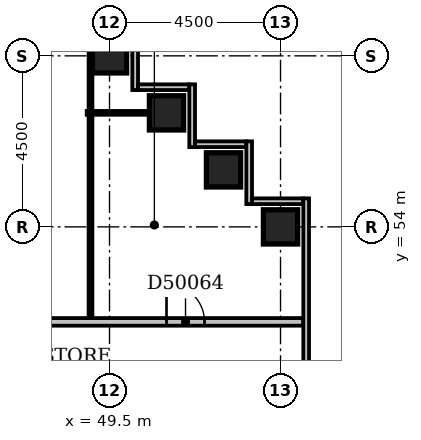
"""IFC4 building model, lengths in metres.
Left out: names, types, materials, properties, quantities, classifications, styles, units other than length and angle.
Written with IfcOpenShell. Run it as: python <this file> out.ifc"""

import sys

from ifc_helpers import new_model, si_unit, direction, frame, frame_2d, origin, origin_2d, place, context, subcontext, project, spatial, rectangle, extrude, element, fill, save


model = new_model("IFC4")
c1 = context("Model", 3, precision=1e-05, world=origin(), true_north=direction((0.0, 1.0)))
c2 = subcontext(c1, "Body", "Model", "MODEL_VIEW")
j1 = project(units=[si_unit("LENGTHUNIT", "METRE"), si_unit("PLANEANGLEUNIT", "RADIAN")], contexts=[c1])
p1 = place(None, origin())
s1 = spatial("IfcSite", under=j1, at=p1, CompositionType="ELEMENT")
p2 = place(p1, origin())
s2 = spatial("IfcBuilding", under=s1, at=p2, CompositionType="ELEMENT")
p3 = place(p2, frame((0.0, 0.0, 197.0)))
s3 = spatial("IfcBuildingStorey", under=s2, at=p3, CompositionType="ELEMENT", Elevation=197.0)
for number, where, z_axis, x_axis in (
    (1, (54.0, 54.0, -0.3), (0.0, 0.0, 1.0), (1.0, 0.0, 0.0)),
    (2, (52.5, 55.5, -0.3), (0.0, 0.0, 1.0), (1.0, 0.0, 0.0)),
    (3, (51.0, 57.0, -0.3), (0.0, 0.0, 1.0), (1.0, 0.0, 0.0)),
    (4, (49.5, 58.5, -0.3), (0.0, 0.0, 1.0), (1.0, 0.0, 0.0)),
):
    element("IfcColumn", number, at=place(p3, frame(where, z_axis=z_axis, x_axis=x_axis)), inside=s3, PredefinedType="COLUMN", context=c2, shape_type="SweptSolid", body=[
        extrude(rectangle(XDim=0.9, YDim=0.9, at=origin_2d()), origin(), (0.0, 0.0, 1.0), 3.6),
    ])
p4 = place(p3, frame((54.675, 39.9, 0.0), z_axis=(0.0, 0.0, 1.0), x_axis=(0.0, 1.0, 0.0)))
e5 = element("IfcWall", 5, at=p4, inside=s3, PredefinedType="STANDARD", context=c2, shape_type="SweptSolid", body=[
    extrude(rectangle(XDim=14.85, YDim=0.15, at=frame_2d((7.425, 0.0))), origin(), (0.0, 0.0, 1.0), 2.7),
])
p5 = place(p4, frame((5.848, 0.0, 0.6)))
e6 = element("IfcOpeningElement", 6, at=p5, cuts=e5, PredefinedType="OPENING", context=c2, shape_type="SweptSolid", body=[
    extrude(rectangle(XDim=0.6, YDim=1.8, at=frame_2d((0.3, 0.9))), frame((0.0, 0.087, 0.0), z_axis=(0.0, -1.0, 0.0), x_axis=(1.0, 0.0, 0.0)), (0.0, 0.0, 1.0), 0.174),
])
p6 = place(p4, frame((8.226, 0.0, 0.6)))
e7 = element("IfcOpeningElement", 7, at=p6, cuts=e5, PredefinedType="OPENING", context=c2, shape_type="SweptSolid", body=[
    extrude(rectangle(XDim=0.6, YDim=1.8, at=frame_2d((0.3, 0.9))), frame((0.0, 0.087, 0.0), z_axis=(0.0, -1.0, 0.0), x_axis=(1.0, 0.0, 0.0)), (0.0, 0.0, 1.0), 0.174),
])
p7 = place(p3, frame((54.6, 54.675, 0.0), z_axis=(0.0, 0.0, 1.0), x_axis=(-1.0, 0.0, 0.0)))
e8 = element("IfcWall", 8, at=p7, inside=s3, PredefinedType="STANDARD", context=c2, shape_type="SweptSolid", body=[
    extrude(rectangle(XDim=1.35, YDim=0.15, at=frame_2d((0.675, 0.0))), origin(), (0.0, 0.0, 1.0), 2.7),
])
p8 = place(p3, frame((53.175, 54.6, 0.0), z_axis=(0.0, 0.0, 1.0), x_axis=(0.0, 1.0, 0.0)))
e9 = element("IfcWall", 9, at=p8, inside=s3, PredefinedType="STANDARD", context=c2, shape_type="SweptSolid", body=[
    extrude(rectangle(XDim=1.65, YDim=0.15, at=frame_2d((0.825, 0.0))), origin(), (0.0, 0.0, 1.0), 2.7),
])
p9 = place(p3, frame((53.1, 56.175, 0.0), z_axis=(0.0, 0.0, 1.0), x_axis=(-1.0, 0.0, 0.0)))
e10 = element("IfcWall", 10, at=p9, inside=s3, PredefinedType="STANDARD", context=c2, shape_type="SweptSolid", body=[
    extrude(rectangle(XDim=1.35, YDim=0.15, at=frame_2d((0.675, 0.0))), origin(), (0.0, 0.0, 1.0), 2.7),
])
p10 = place(p3, frame((51.675, 56.1, 0.0), z_axis=(0.0, 0.0, 1.0), x_axis=(0.0, 1.0, 0.0)))
e11 = element("IfcWall", 11, at=p10, inside=s3, PredefinedType="STANDARD", context=c2, shape_type="SweptSolid", body=[
    extrude(rectangle(XDim=1.65, YDim=0.15, at=frame_2d((0.825, 0.0))), origin(), (0.0, 0.0, 1.0), 2.7),
])
p11 = place(p3, frame((51.6, 57.675, 0.0), z_axis=(0.0, 0.0, 1.0), x_axis=(-1.0, 0.0, 0.0)))
e12 = element("IfcWall", 12, at=p11, inside=s3, PredefinedType="STANDARD", context=c2, shape_type="SweptSolid", body=[
    extrude(rectangle(XDim=1.35, YDim=0.15, at=frame_2d((0.675, 0.0))), origin(), (0.0, 0.0, 1.0), 2.7),
])
p12 = place(p3, frame((50.175, 57.6, 0.0), z_axis=(0.0, 0.0, 1.0), x_axis=(0.0, 1.0, 0.0)))
e13 = element("IfcWall", 13, at=p12, inside=s3, PredefinedType="STANDARD", context=c2, shape_type="SweptSolid", body=[
    extrude(rectangle(XDim=1.65, YDim=0.15, at=frame_2d((0.825, 0.0))), origin(), (0.0, 0.0, 1.0), 2.7),
])
p13 = place(p3, frame((44.1, 51.5, 0.0), z_axis=(0.0, 0.0, 1.0), x_axis=(1.0, 0.0, 0.0)))
e14 = element("IfcWall", 14, at=p13, inside=s3, PredefinedType="PARTITIONING", context=c2, shape_type="SweptSolid", body=[
    extrude(rectangle(XDim=10.5, YDim=0.2, at=frame_2d((5.25, 0.0))), origin(), (0.0, 0.0, 1.0), 3.3),
])
p14 = place(p13, frame((1.9, 0.0, 0.0)))
e15 = element("IfcOpeningElement", 15, at=p14, cuts=e14, PredefinedType="OPENING", context=c2, shape_type="SweptSolid", body=[
    extrude(rectangle(XDim=1.0, YDim=2.1, at=frame_2d((0.5, 1.05))), frame((0.0, 0.112, 0.0), z_axis=(0.0, -1.0, 0.0), x_axis=(1.0, 0.0, 0.0)), (0.0, 0.0, 1.0), 0.224),
])
p15 = place(p13, frame((6.9, 0.0, 0.0)))
e16 = element("IfcOpeningElement", 16, at=p15, cuts=e14, PredefinedType="OPENING", context=c2, shape_type="SweptSolid", body=[
    extrude(rectangle(XDim=1.0, YDim=2.1, at=frame_2d((0.5, 1.05))), frame((0.0, 0.112, 0.0), z_axis=(0.0, -1.0, 0.0), x_axis=(1.0, 0.0, 0.0)), (0.0, 0.0, 1.0), 0.224),
])
p16 = place(p3, frame((49.0, 51.6, 0.0), z_axis=(0.0, 0.0, 1.0), x_axis=(0.0, 1.0, 0.0)))
e17 = element("IfcWall", 17, at=p16, inside=s3, PredefinedType="PARTITIONING", context=c2, shape_type="SweptSolid", body=[
    extrude(rectangle(XDim=7.5, YDim=0.1, at=frame_2d((3.75, 0.0))), origin(), (0.0, 0.0, 1.0), 3.3),
])
p17 = place(p3, frame((48.9, 57.0, 0.0), z_axis=(0.0, 0.0, 1.0), x_axis=(1.0, 0.0, 0.0)))
e18 = element("IfcWall", 18, at=p17, inside=s3, PredefinedType="PARTITIONING", context=c2, shape_type="SweptSolid", body=[
    extrude(rectangle(XDim=1.65, YDim=0.1, at=frame_2d((0.825, 0.0))), origin(), (0.0, 0.0, 1.0), 3.3),
])
p18 = place(p15, origin())
e19 = element("IfcDoor", 19, at=p18, inside=s3, OperationType="SINGLE_SWING_LEFT", PredefinedType="DOOR", context=c2, shape_type="SweptSolid", body=[
    extrude(rectangle(XDim=1.0, YDim=2.1, at=frame_2d((0.5, 1.05))), frame((0.0, 0.025, 0.0), z_axis=(0.0, -1.0, 0.0), x_axis=(1.0, 0.0, 0.0)), (0.0, 0.0, 1.0), 0.05),
])
fill(e16, e19)
save(model, sys.argv[1])
